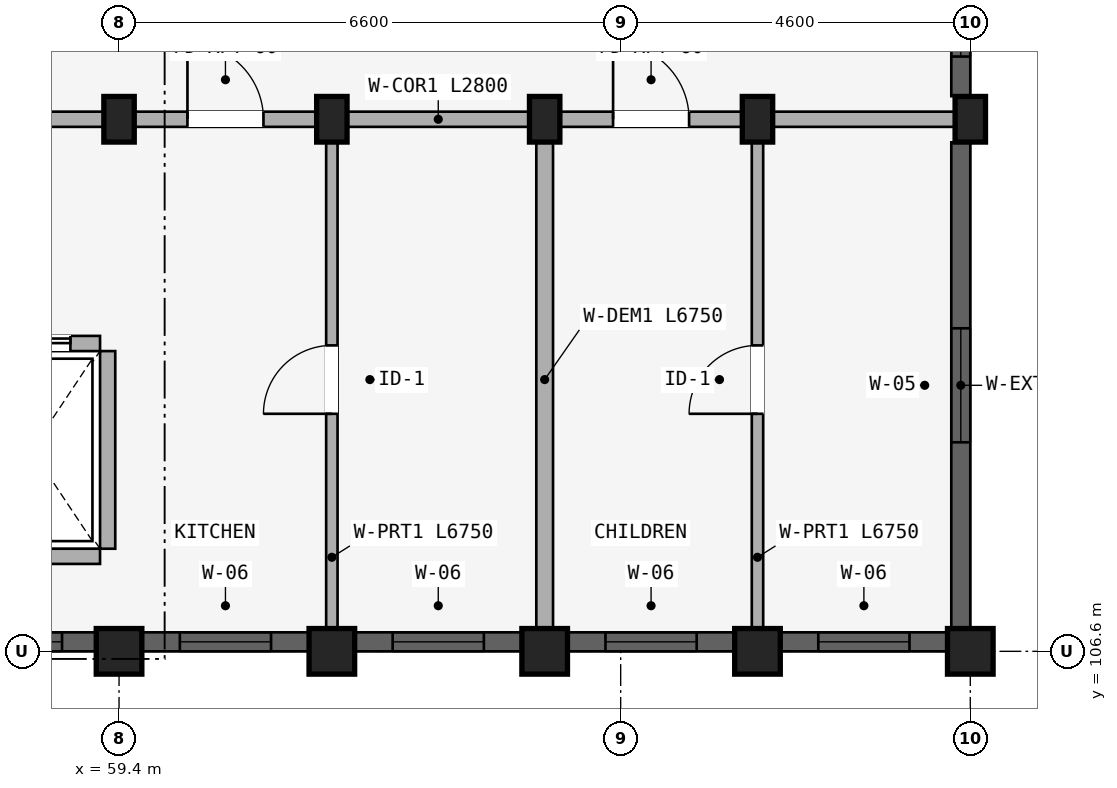
"""IFC4 building model, lengths in metres.
Left out: names, types, materials, properties, quantities, classifications, styles, units other than length and angle.
Written with IfcOpenShell. Run it as: python <this file> out.ifc"""

import sys

from ifc_helpers import new_model, si_unit, direction, frame, frame_2d, origin, origin_2d, place, context, subcontext, project, spatial, rectangle, extrude, element, fill, save


model = new_model("IFC4")
c1 = context("Model", 3, precision=1e-05, world=origin(), true_north=direction((0.0, 1.0)))
c2 = subcontext(c1, "Body", "Model", "MODEL_VIEW")
j1 = project(units=[si_unit("LENGTHUNIT", "METRE"), si_unit("PLANEANGLEUNIT", "RADIAN")], contexts=[c1])
p1 = place(None, origin())
s1 = spatial("IfcSite", under=j1, at=p1, CompositionType="ELEMENT")
p2 = place(p1, origin())
s2 = spatial("IfcBuilding", under=s1, at=p2, CompositionType="ELEMENT")
p3 = place(p2, frame((0.0, 0.0, 40.2)))
s3 = spatial("IfcBuildingStorey", under=s2, at=p3, CompositionType="ELEMENT", Elevation=40.2)
p4 = place(p3, frame((59.4, 106.6, 0.0), z_axis=(0.0, 0.0, 1.0), x_axis=(1.0, 0.0, 0.0)))
e1 = element("IfcColumn", 1, at=p4, inside=s3, PredefinedType="COLUMN", context=c2, shape_type="SweptSolid", body=[
    extrude(rectangle(XDim=0.6, YDim=0.6, at=origin_2d()), origin(), (0.0, 0.0, 1.0), 2.93),
])
p5 = place(p3, frame((59.4, 113.6, 0.0), z_axis=(0.0, 0.0, 1.0), x_axis=(1.0, 0.0, 0.0)))
e2 = element("IfcColumn", 2, at=p5, inside=s3, PredefinedType="COLUMN", context=c2, shape_type="SweptSolid", body=[
    extrude(rectangle(XDim=0.4, YDim=0.6, at=origin_2d()), origin(), (0.0, 0.0, 1.0), 2.93),
])
p6 = place(p3, frame((62.2, 106.6, 0.0), z_axis=(0.0, 0.0, 1.0), x_axis=(1.0, 0.0, 0.0)))
e3 = element("IfcColumn", 3, at=p6, inside=s3, PredefinedType="COLUMN", context=c2, shape_type="SweptSolid", body=[
    extrude(rectangle(XDim=0.6, YDim=0.6, at=origin_2d()), origin(), (0.0, 0.0, 1.0), 2.93),
])
p7 = place(p3, frame((62.2, 113.6, 0.0), z_axis=(0.0, 0.0, 1.0), x_axis=(1.0, 0.0, 0.0)))
e4 = element("IfcColumn", 4, at=p7, inside=s3, PredefinedType="COLUMN", context=c2, shape_type="SweptSolid", body=[
    extrude(rectangle(XDim=0.4, YDim=0.6, at=origin_2d()), origin(), (0.0, 0.0, 1.0), 2.93),
])
p8 = place(p3, frame((65.0, 106.6, 0.0), z_axis=(0.0, 0.0, 1.0), x_axis=(1.0, 0.0, 0.0)))
e5 = element("IfcColumn", 5, at=p8, inside=s3, PredefinedType="COLUMN", context=c2, shape_type="SweptSolid", body=[
    extrude(rectangle(XDim=0.6, YDim=0.6, at=origin_2d()), origin(), (0.0, 0.0, 1.0), 2.93),
])
p9 = place(p3, frame((65.0, 113.6, 0.0), z_axis=(0.0, 0.0, 1.0), x_axis=(1.0, 0.0, 0.0)))
e6 = element("IfcColumn", 6, at=p9, inside=s3, PredefinedType="COLUMN", context=c2, shape_type="SweptSolid", body=[
    extrude(rectangle(XDim=0.4, YDim=0.6, at=origin_2d()), origin(), (0.0, 0.0, 1.0), 2.93),
])
p10 = place(p3, frame((67.8, 106.6, 0.0), z_axis=(0.0, 0.0, 1.0), x_axis=(1.0, 0.0, 0.0)))
e7 = element("IfcColumn", 7, at=p10, inside=s3, PredefinedType="COLUMN", context=c2, shape_type="SweptSolid", body=[
    extrude(rectangle(XDim=0.6, YDim=0.6, at=origin_2d()), origin(), (0.0, 0.0, 1.0), 2.93),
])
p11 = place(p3, frame((67.8, 113.6, 0.0), z_axis=(0.0, 0.0, 1.0), x_axis=(1.0, 0.0, 0.0)))
e8 = element("IfcColumn", 8, at=p11, inside=s3, PredefinedType="COLUMN", context=c2, shape_type="SweptSolid", body=[
    extrude(rectangle(XDim=0.4, YDim=0.6, at=origin_2d()), origin(), (0.0, 0.0, 1.0), 2.93),
])
p12 = place(p3, frame((70.6, 106.6, 0.0), z_axis=(0.0, 0.0, 1.0), x_axis=(1.0, 0.0, 0.0)))
e9 = element("IfcColumn", 9, at=p12, inside=s3, PredefinedType="COLUMN", context=c2, shape_type="SweptSolid", body=[
    extrude(rectangle(XDim=0.6, YDim=0.6, at=origin_2d()), origin(), (0.0, 0.0, 1.0), 2.93),
])
p13 = place(p3, frame((70.6, 113.6, 0.0), z_axis=(0.0, 0.0, 1.0), x_axis=(1.0, 0.0, 0.0)))
e10 = element("IfcColumn", 10, at=p13, inside=s3, PredefinedType="COLUMN", context=c2, shape_type="SweptSolid", body=[
    extrude(rectangle(XDim=0.4, YDim=0.6, at=origin_2d()), origin(), (0.0, 0.0, 1.0), 2.93),
])
p14 = place(p3, frame((59.25, 107.95, 0.0), z_axis=(0.0, 0.0, 1.0), x_axis=(0.0, 1.0, 0.0)))
e11 = element("IfcWall", 11, at=p14, inside=s3, PredefinedType="STANDARD", context=c2, shape_type="SweptSolid", body=[
    extrude(rectangle(XDim=2.6, YDim=0.2, at=frame_2d((1.3, 0.0))), origin(), (0.0, 0.0, 1.0), 2.372),
])
p15 = place(p3, frame((57.35, 107.85, 0.0), z_axis=(0.0, 0.0, 1.0), x_axis=(1.0, 0.0, 0.0)))
e12 = element("IfcWall", 12, at=p15, inside=s3, PredefinedType="STANDARD", context=c2, shape_type="SweptSolid", body=[
    extrude(rectangle(XDim=1.8, YDim=0.2, at=frame_2d((0.9, 0.0))), origin(), (0.0, 0.0, 1.0), 2.93),
])
p16 = place(p3, frame((57.35, 110.65, 0.0), z_axis=(0.0, 0.0, 1.0), x_axis=(1.0, 0.0, 0.0)))
e13 = element("IfcWall", 13, at=p16, inside=s3, PredefinedType="STANDARD", context=c2, shape_type="SweptSolid", body=[
    extrude(rectangle(XDim=1.8, YDim=0.2, at=frame_2d((0.9, 0.0))), origin(), (0.0, 0.0, 1.0), 2.93),
])
p17 = place(p16, frame((0.39, 0.0, 0.0)))
e14 = element("IfcOpeningElement", 14, at=p17, cuts=e13, PredefinedType="OPENING", context=c2, shape_type="SweptSolid", body=[
    extrude(rectangle(XDim=1.02, YDim=2.15, at=frame_2d((0.51, 1.075))), frame((0.0, 0.11, 0.0), z_axis=(0.0, -1.0, 0.0), x_axis=(1.0, 0.0, 0.0)), (0.0, 0.0, 1.0), 0.22),
])
p18 = place(p3, frame((53.75, 113.6, 0.0), z_axis=(0.0, 0.0, 1.0), x_axis=(1.0, 0.0, 0.0)))
e15 = element("IfcWall", 15, at=p18, inside=s3, PredefinedType="STANDARD", context=c2, shape_type="SweptSolid", body=[
    extrude(rectangle(XDim=5.6, YDim=0.2, at=frame_2d((2.8, 0.0))), origin(), (0.0, 0.0, 1.0), 2.372),
])
p19 = place(p18, frame((1.91, 0.0, 0.0)))
e16 = element("IfcOpeningElement", 16, at=p19, cuts=e15, PredefinedType="OPENING", context=c2, shape_type="SweptSolid", body=[
    extrude(rectangle(XDim=1.22, YDim=2.15, at=frame_2d((0.61, 1.075))), frame((0.0, 0.11, 0.0), z_axis=(0.0, -1.0, 0.0), x_axis=(1.0, 0.0, 0.0)), (0.0, 0.0, 1.0), 0.22),
])
p20 = place(p3, frame((59.4, 113.6, 0.0), z_axis=(0.0, 0.0, 1.0), x_axis=(1.0, 0.0, 0.0)))
e17 = element("IfcWall", 17, at=p20, inside=s3, PredefinedType="STANDARD", context=c2, shape_type="SweptSolid", body=[
    extrude(rectangle(XDim=2.8, YDim=0.2, at=frame_2d((1.4, 0.0))), origin(), (0.0, 0.0, 1.0), 2.372),
])
p21 = place(p20, frame((0.9, 0.0, 0.0)))
e18 = element("IfcOpeningElement", 18, at=p21, cuts=e17, PredefinedType="OPENING", context=c2, shape_type="SweptSolid", body=[
    extrude(rectangle(XDim=1.0, YDim=2.15, at=frame_2d((0.5, 1.075))), frame((0.0, 0.11, 0.0), z_axis=(0.0, -1.0, 0.0), x_axis=(1.0, 0.0, 0.0)), (0.0, 0.0, 1.0), 0.22),
])
p22 = place(p3, frame((62.2, 113.6, 0.0), z_axis=(0.0, 0.0, 1.0), x_axis=(1.0, 0.0, 0.0)))
e19 = element("IfcWall", 19, at=p22, inside=s3, PredefinedType="STANDARD", context=c2, shape_type="SweptSolid", body=[
    extrude(rectangle(XDim=2.8, YDim=0.2, at=frame_2d((1.4, 0.0))), origin(), (0.0, 0.0, 1.0), 2.372),
])
p23 = place(p3, frame((65.0, 113.6, 0.0), z_axis=(0.0, 0.0, 1.0), x_axis=(1.0, 0.0, 0.0)))
e20 = element("IfcWall", 20, at=p23, inside=s3, PredefinedType="STANDARD", context=c2, shape_type="SweptSolid", body=[
    extrude(rectangle(XDim=2.8, YDim=0.2, at=frame_2d((1.4, 0.0))), origin(), (0.0, 0.0, 1.0), 2.372),
])
p24 = place(p23, frame((0.9, 0.0, 0.0)))
e21 = element("IfcOpeningElement", 21, at=p24, cuts=e20, PredefinedType="OPENING", context=c2, shape_type="SweptSolid", body=[
    extrude(rectangle(XDim=1.0, YDim=2.15, at=frame_2d((0.5, 1.075))), frame((0.0, 0.11, 0.0), z_axis=(0.0, -1.0, 0.0), x_axis=(1.0, 0.0, 0.0)), (0.0, 0.0, 1.0), 0.22),
])
p25 = place(p3, frame((67.8, 113.6, 0.0), z_axis=(0.0, 0.0, 1.0), x_axis=(1.0, 0.0, 0.0)))
e22 = element("IfcWall", 22, at=p25, inside=s3, PredefinedType="STANDARD", context=c2, shape_type="SweptSolid", body=[
    extrude(rectangle(XDim=2.8, YDim=0.2, at=frame_2d((1.4, 0.0))), origin(), (0.0, 0.0, 1.0), 2.372),
])
p26 = place(p3, frame((62.2, 106.8, 0.0), z_axis=(0.0, 0.0, 1.0), x_axis=(0.0, 1.0, 0.0)))
e23 = element("IfcWall", 23, at=p26, inside=s3, PredefinedType="PARTITIONING", context=c2, shape_type="SweptSolid", body=[
    extrude(rectangle(XDim=6.75, YDim=0.15, at=frame_2d((3.375, 0.0))), origin(), (0.0, 0.0, 1.0), 2.372),
])
p27 = place(p26, frame((2.925, 0.0, 0.0)))
e24 = element("IfcOpeningElement", 24, at=p27, cuts=e23, PredefinedType="OPENING", context=c2, shape_type="SweptSolid", body=[
    extrude(rectangle(XDim=0.9, YDim=2.1, at=frame_2d((0.45, 1.05))), frame((0.0, 0.085, 0.0), z_axis=(0.0, -1.0, 0.0), x_axis=(1.0, 0.0, 0.0)), (0.0, 0.0, 1.0), 0.17),
])
p28 = place(p3, frame((65.0, 106.8, 0.0), z_axis=(0.0, 0.0, 1.0), x_axis=(0.0, 1.0, 0.0)))
e25 = element("IfcWall", 25, at=p28, inside=s3, PredefinedType="STANDARD", context=c2, shape_type="SweptSolid", body=[
    extrude(rectangle(XDim=6.75, YDim=0.22, at=frame_2d((3.375, 0.0))), origin(), (0.0, 0.0, 1.0), 2.372),
])
p29 = place(p3, frame((67.8, 106.8, 0.0), z_axis=(0.0, 0.0, 1.0), x_axis=(0.0, 1.0, 0.0)))
e26 = element("IfcWall", 26, at=p29, inside=s3, PredefinedType="PARTITIONING", context=c2, shape_type="SweptSolid", body=[
    extrude(rectangle(XDim=6.75, YDim=0.15, at=frame_2d((3.375, 0.0))), origin(), (0.0, 0.0, 1.0), 2.372),
])
p30 = place(p29, frame((2.925, 0.0, 0.0)))
e27 = element("IfcOpeningElement", 27, at=p30, cuts=e26, PredefinedType="OPENING", context=c2, shape_type="SweptSolid", body=[
    extrude(rectangle(XDim=0.9, YDim=2.1, at=frame_2d((0.45, 1.05))), frame((0.0, 0.085, 0.0), z_axis=(0.0, -1.0, 0.0), x_axis=(1.0, 0.0, 0.0)), (0.0, 0.0, 1.0), 0.17),
])
p31 = place(p3, frame((56.628, 106.725, 0.0), z_axis=(0.0, 0.0, 1.0), x_axis=(1.0, 0.0, 0.0)))
e28 = element("IfcWall", 28, at=p31, inside=s3, PredefinedType="STANDARD", context=c2, shape_type="SweptSolid", body=[
    extrude(rectangle(XDim=2.468, YDim=0.25, at=frame_2d((1.234, 0.0))), origin(), (0.0, 0.0, 1.0), 2.472),
])
p32 = place(p31, frame((0.822, 0.0, 0.772)))
e29 = element("IfcOpeningElement", 29, at=p32, cuts=e28, PredefinedType="OPENING", context=c2, shape_type="SweptSolid", body=[
    extrude(rectangle(XDim=1.2, YDim=1.5, at=frame_2d((0.6, 0.75))), frame((0.0, 0.135, 0.0), z_axis=(0.0, -1.0, 0.0), x_axis=(1.0, 0.0, 0.0)), (0.0, 0.0, 1.0), 0.27),
])
p33 = place(p3, frame((59.704, 106.725, 0.0), z_axis=(0.0, 0.0, 1.0), x_axis=(1.0, 0.0, 0.0)))
e30 = element("IfcWall", 30, at=p33, inside=s3, PredefinedType="STANDARD", context=c2, shape_type="SweptSolid", body=[
    extrude(rectangle(XDim=2.193, YDim=0.25, at=frame_2d((1.096, 0.0))), origin(), (0.0, 0.0, 1.0), 2.472),
])
p34 = place(p33, frame((0.497, 0.0, 0.772)))
e31 = element("IfcOpeningElement", 31, at=p34, cuts=e30, PredefinedType="OPENING", context=c2, shape_type="SweptSolid", body=[
    extrude(rectangle(XDim=1.2, YDim=1.5, at=frame_2d((0.6, 0.75))), frame((0.0, 0.135, 0.0), z_axis=(0.0, -1.0, 0.0), x_axis=(1.0, 0.0, 0.0)), (0.0, 0.0, 1.0), 0.27),
])
p35 = place(p3, frame((62.503, 106.725, 0.0), z_axis=(0.0, 0.0, 1.0), x_axis=(1.0, 0.0, 0.0)))
e32 = element("IfcWall", 32, at=p35, inside=s3, PredefinedType="STANDARD", context=c2, shape_type="SweptSolid", body=[
    extrude(rectangle(XDim=2.193, YDim=0.25, at=frame_2d((1.097, 0.0))), origin(), (0.0, 0.0, 1.0), 2.472),
])
p36 = place(p35, frame((0.497, 0.0, 0.772)))
e33 = element("IfcOpeningElement", 33, at=p36, cuts=e32, PredefinedType="OPENING", context=c2, shape_type="SweptSolid", body=[
    extrude(rectangle(XDim=1.2, YDim=1.5, at=frame_2d((0.6, 0.75))), frame((0.0, 0.135, 0.0), z_axis=(0.0, -1.0, 0.0), x_axis=(1.0, 0.0, 0.0)), (0.0, 0.0, 1.0), 0.27),
])
p37 = place(p3, frame((65.303, 106.725, 0.0), z_axis=(0.0, 0.0, 1.0), x_axis=(1.0, 0.0, 0.0)))
e34 = element("IfcWall", 34, at=p37, inside=s3, PredefinedType="STANDARD", context=c2, shape_type="SweptSolid", body=[
    extrude(rectangle(XDim=2.193, YDim=0.25, at=frame_2d((1.097, 0.0))), origin(), (0.0, 0.0, 1.0), 2.472),
])
p38 = place(p37, frame((0.497, 0.0, 0.772)))
e35 = element("IfcOpeningElement", 35, at=p38, cuts=e34, PredefinedType="OPENING", context=c2, shape_type="SweptSolid", body=[
    extrude(rectangle(XDim=1.2, YDim=1.5, at=frame_2d((0.6, 0.75))), frame((0.0, 0.135, 0.0), z_axis=(0.0, -1.0, 0.0), x_axis=(1.0, 0.0, 0.0)), (0.0, 0.0, 1.0), 0.27),
])
p39 = place(p3, frame((68.104, 106.725, 0.0), z_axis=(0.0, 0.0, 1.0), x_axis=(1.0, 0.0, 0.0)))
e36 = element("IfcWall", 36, at=p39, inside=s3, PredefinedType="STANDARD", context=c2, shape_type="SweptSolid", body=[
    extrude(rectangle(XDim=2.193, YDim=0.25, at=frame_2d((1.096, 0.0))), origin(), (0.0, 0.0, 1.0), 2.472),
])
p40 = place(p39, frame((0.497, 0.0, 0.772)))
e37 = element("IfcOpeningElement", 37, at=p40, cuts=e36, PredefinedType="OPENING", context=c2, shape_type="SweptSolid", body=[
    extrude(rectangle(XDim=1.2, YDim=1.5, at=frame_2d((0.6, 0.75))), frame((0.0, 0.135, 0.0), z_axis=(0.0, -1.0, 0.0), x_axis=(1.0, 0.0, 0.0)), (0.0, 0.0, 1.0), 0.27),
])
p41 = place(p3, frame((70.475, 106.904, 0.0), z_axis=(0.0, 0.0, 1.0), x_axis=(0.0, 1.0, 0.0)))
e38 = element("IfcWall", 38, at=p41, inside=s3, PredefinedType="STANDARD", context=c2, shape_type="SweptSolid", body=[
    extrude(rectangle(XDim=6.393, YDim=0.25, at=frame_2d((3.196, 0.0))), origin(), (0.0, 0.0, 1.0), 2.372),
])
p42 = place(p41, frame((2.447, 0.0, 0.522)))
e39 = element("IfcOpeningElement", 39, at=p42, cuts=e38, PredefinedType="OPENING", context=c2, shape_type="SweptSolid", body=[
    extrude(rectangle(XDim=1.5, YDim=1.65, at=frame_2d((0.75, 0.825))), frame((0.0, 0.135, 0.0), z_axis=(0.0, -1.0, 0.0), x_axis=(1.0, 0.0, 0.0)), (0.0, 0.0, 1.0), 0.27),
])
p43 = place(p3, frame((70.475, 113.904, 0.0), z_axis=(0.0, 0.0, 1.0), x_axis=(0.0, 1.0, 0.0)))
e40 = element("IfcWall", 40, at=p43, inside=s3, PredefinedType="STANDARD", context=c2, shape_type="SweptSolid", body=[
    extrude(rectangle(XDim=1.793, YDim=0.25, at=frame_2d((0.896, 0.0))), origin(), (0.0, 0.0, 1.0), 2.372),
])
p44 = place(p43, frame((0.521, 0.0, 0.88)))
e41 = element("IfcOpeningElement", 41, at=p44, cuts=e40, PredefinedType="OPENING", context=c2, shape_type="SweptSolid", body=[
    extrude(rectangle(XDim=0.75, YDim=1.05, at=frame_2d((0.375, 0.525))), frame((0.0, 0.135, 0.0), z_axis=(0.0, -1.0, 0.0), x_axis=(1.0, 0.0, 0.0)), (0.0, 0.0, 1.0), 0.27),
])
p45 = place(p32, origin())
e42 = element("IfcWindow", 42, at=p45, inside=s3, PartitioningType="SINGLE_PANEL", PredefinedType="WINDOW", context=c2, shape_type="SweptSolid", body=[
    extrude(rectangle(XDim=1.2, YDim=1.5, at=frame_2d((0.6, 0.75))), frame((0.0, 0.03, 0.0), z_axis=(0.0, -1.0, 0.0), x_axis=(1.0, 0.0, 0.0)), (0.0, 0.0, 1.0), 0.06),
])
fill(e29, e42)
p46 = place(p34, origin())
e43 = element("IfcWindow", 43, at=p46, inside=s3, PartitioningType="SINGLE_PANEL", PredefinedType="WINDOW", context=c2, shape_type="SweptSolid", body=[
    extrude(rectangle(XDim=1.2, YDim=1.5, at=frame_2d((0.6, 0.75))), frame((0.0, 0.03, 0.0), z_axis=(0.0, -1.0, 0.0), x_axis=(1.0, 0.0, 0.0)), (0.0, 0.0, 1.0), 0.06),
])
fill(e31, e43)
p47 = place(p36, origin())
e44 = element("IfcWindow", 44, at=p47, inside=s3, PartitioningType="SINGLE_PANEL", PredefinedType="WINDOW", context=c2, shape_type="SweptSolid", body=[
    extrude(rectangle(XDim=1.2, YDim=1.5, at=frame_2d((0.6, 0.75))), frame((0.0, 0.03, 0.0), z_axis=(0.0, -1.0, 0.0), x_axis=(1.0, 0.0, 0.0)), (0.0, 0.0, 1.0), 0.06),
])
fill(e33, e44)
p48 = place(p38, origin())
e45 = element("IfcWindow", 45, at=p48, inside=s3, PartitioningType="SINGLE_PANEL", PredefinedType="WINDOW", context=c2, shape_type="SweptSolid", body=[
    extrude(rectangle(XDim=1.2, YDim=1.5, at=frame_2d((0.6, 0.75))), frame((0.0, 0.03, 0.0), z_axis=(0.0, -1.0, 0.0), x_axis=(1.0, 0.0, 0.0)), (0.0, 0.0, 1.0), 0.06),
])
fill(e35, e45)
p49 = place(p40, origin())
e46 = element("IfcWindow", 46, at=p49, inside=s3, PartitioningType="SINGLE_PANEL", PredefinedType="WINDOW", context=c2, shape_type="SweptSolid", body=[
    extrude(rectangle(XDim=1.2, YDim=1.5, at=frame_2d((0.6, 0.75))), frame((0.0, 0.03, 0.0), z_axis=(0.0, -1.0, 0.0), x_axis=(1.0, 0.0, 0.0)), (0.0, 0.0, 1.0), 0.06),
])
fill(e37, e46)
p50 = place(p42, origin())
e47 = element("IfcWindow", 47, at=p50, inside=s3, PartitioningType="DOUBLE_PANEL_VERTICAL", PredefinedType="WINDOW", context=c2, shape_type="SweptSolid", body=[
    extrude(rectangle(XDim=1.5, YDim=1.65, at=frame_2d((0.75, 0.825))), frame((0.0, 0.03, 0.0), z_axis=(0.0, -1.0, 0.0), x_axis=(1.0, 0.0, 0.0)), (0.0, 0.0, 1.0), 0.06),
])
fill(e39, e47)
p51 = place(p44, origin())
e48 = element("IfcWindow", 48, at=p51, inside=s3, PartitioningType="SINGLE_PANEL", PredefinedType="WINDOW", context=c2, shape_type="SweptSolid", body=[
    extrude(rectangle(XDim=0.75, YDim=1.05, at=frame_2d((0.375, 0.525))), frame((0.0, 0.03, 0.0), z_axis=(0.0, -1.0, 0.0), x_axis=(1.0, 0.0, 0.0)), (0.0, 0.0, 1.0), 0.06),
])
fill(e41, e48)
p52 = place(p17, origin())
e49 = element("IfcDoor", 49, at=p52, inside=s3, OperationType="SLIDING_TO_RIGHT", PredefinedType="DOOR", context=c2, shape_type="SweptSolid", body=[
    extrude(rectangle(XDim=1.02, YDim=2.15, at=frame_2d((0.51, 1.075))), frame((0.0, 0.025, 0.0), z_axis=(0.0, -1.0, 0.0), x_axis=(1.0, 0.0, 0.0)), (0.0, 0.0, 1.0), 0.05),
])
fill(e14, e49)
p53 = place(p21, frame((1.0, 0.0, 0.0), z_axis=(0.0, 0.0, 1.0), x_axis=(-1.0, 0.0, 0.0)))
e50 = element("IfcDoor", 50, at=p53, inside=s3, OperationType="SINGLE_SWING_RIGHT", PredefinedType="DOOR", context=c2, shape_type="SweptSolid", body=[
    extrude(rectangle(XDim=1.0, YDim=2.15, at=frame_2d((0.5, 1.075))), frame((0.0, 0.025, 0.0), z_axis=(0.0, -1.0, 0.0), x_axis=(1.0, 0.0, 0.0)), (0.0, 0.0, 1.0), 0.05),
])
fill(e18, e50)
p54 = place(p24, frame((1.0, 0.0, 0.0), z_axis=(0.0, 0.0, 1.0), x_axis=(-1.0, 0.0, 0.0)))
e51 = element("IfcDoor", 51, at=p54, inside=s3, OperationType="SINGLE_SWING_RIGHT", PredefinedType="DOOR", context=c2, shape_type="SweptSolid", body=[
    extrude(rectangle(XDim=1.0, YDim=2.15, at=frame_2d((0.5, 1.075))), frame((0.0, 0.025, 0.0), z_axis=(0.0, -1.0, 0.0), x_axis=(1.0, 0.0, 0.0)), (0.0, 0.0, 1.0), 0.05),
])
fill(e21, e51)
p55 = place(p27, origin())
e52 = element("IfcDoor", 52, at=p55, inside=s3, OperationType="SINGLE_SWING_LEFT", PredefinedType="DOOR", context=c2, shape_type="SweptSolid", body=[
    extrude(rectangle(XDim=0.9, YDim=2.1, at=frame_2d((0.45, 1.05))), frame((0.0, 0.025, 0.0), z_axis=(0.0, -1.0, 0.0), x_axis=(1.0, 0.0, 0.0)), (0.0, 0.0, 1.0), 0.05),
])
fill(e24, e52)
p56 = place(p30, frame((0.9, 0.0, 0.0), z_axis=(0.0, 0.0, 1.0), x_axis=(-1.0, 0.0, 0.0)))
e53 = element("IfcDoor", 53, at=p56, inside=s3, OperationType="SINGLE_SWING_RIGHT", PredefinedType="DOOR", context=c2, shape_type="SweptSolid", body=[
    extrude(rectangle(XDim=0.9, YDim=2.1, at=frame_2d((0.45, 1.05))), frame((0.0, 0.025, 0.0), z_axis=(0.0, -1.0, 0.0), x_axis=(1.0, 0.0, 0.0)), (0.0, 0.0, 1.0), 0.05),
])
fill(e27, e53)
save(model, sys.argv[1])
